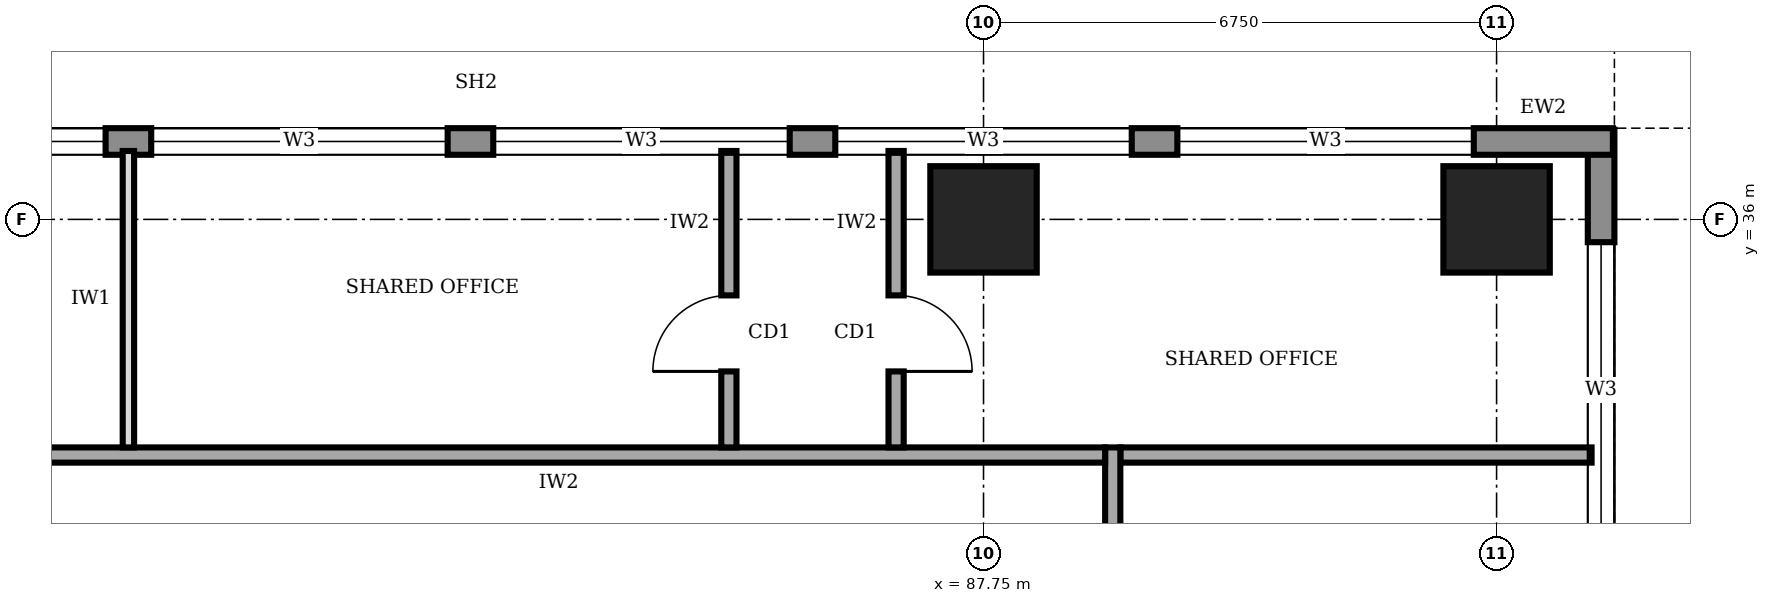
"""IFC4 building model, lengths in metres.
Left out: names, types, materials, properties, quantities, classifications, styles, units other than length and angle.
Written with IfcOpenShell. Run it as: python <this file> out.ifc"""

import sys

from ifc_helpers import new_model, si_unit, direction, frame, frame_2d, origin, origin_2d, place, context, subcontext, project, spatial, rectangle, extrude, element, fill, save


model = new_model("IFC4")
c1 = context("Model", 3, precision=1e-05, world=origin(), true_north=direction((0.0, 1.0)))
c2 = subcontext(c1, "Body", "Model", "MODEL_VIEW")
j1 = project(units=[si_unit("LENGTHUNIT", "METRE"), si_unit("PLANEANGLEUNIT", "RADIAN")], contexts=[c1])
p1 = place(None, origin())
s1 = spatial("IfcSite", under=j1, at=p1, CompositionType="ELEMENT")
p2 = place(p1, origin())
s2 = spatial("IfcBuilding", under=s1, at=p2, CompositionType="ELEMENT")
p3 = place(p2, frame((0.0, 0.0, 197.0)))
s3 = spatial("IfcBuildingStorey", under=s2, at=p3, CompositionType="ELEMENT", Elevation=197.0)
for number, where, z_axis, x_axis in (
    (1, (87.75, 36.0, 0.0), (0.0, 0.0, 1.0), (1.0, 0.0, 0.0)),
    (2, (94.5, 36.0, 0.0), (0.0, 0.0, 1.0), (1.0, 0.0, 0.0)),
):
    element("IfcColumn", number, at=place(p3, frame(where, z_axis=z_axis, x_axis=x_axis)), inside=s3, PredefinedType="COLUMN", context=c2, shape_type="SweptSolid", body=[
        extrude(rectangle(XDim=1.4, YDim=1.4, at=origin_2d()), origin(), (0.0, 0.0, 1.0), 4.0),
    ])
p4 = place(p3, frame((95.875, 3.32, 0.0), z_axis=(0.0, 0.0, 1.0), x_axis=(0.0, 1.0, 0.0)))
e3 = element("IfcWall", 3, at=p4, inside=s3, PredefinedType="STANDARD", context=c2, shape_type="SweptSolid", body=[
    extrude(rectangle(XDim=33.86, YDim=0.35, at=frame_2d((16.93, 0.0))), origin(), (0.0, 0.0, 1.0), 3.75),
])
p5 = place(p4, frame((1.48, 0.0, 0.95)))
e4 = element("IfcOpeningElement", 4, at=p5, cuts=e3, PredefinedType="OPENING", context=c2, shape_type="SweptSolid", body=[
    extrude(rectangle(XDim=3.9, YDim=1.8, at=frame_2d((1.95, 0.9))), frame((0.0, 0.185, 0.0), z_axis=(0.0, -1.0, 0.0), x_axis=(1.0, 0.0, 0.0)), (0.0, 0.0, 1.0), 0.37),
])
p6 = place(p4, frame((5.98, 0.0, 0.95)))
e5 = element("IfcOpeningElement", 5, at=p6, cuts=e3, PredefinedType="OPENING", context=c2, shape_type="SweptSolid", body=[
    extrude(rectangle(XDim=3.9, YDim=1.8, at=frame_2d((1.95, 0.9))), frame((0.0, 0.185, 0.0), z_axis=(0.0, -1.0, 0.0), x_axis=(1.0, 0.0, 0.0)), (0.0, 0.0, 1.0), 0.37),
])
p7 = place(p4, frame((10.48, 0.0, 0.95)))
e6 = element("IfcOpeningElement", 6, at=p7, cuts=e3, PredefinedType="OPENING", context=c2, shape_type="SweptSolid", body=[
    extrude(rectangle(XDim=3.9, YDim=1.8, at=frame_2d((1.95, 0.9))), frame((0.0, 0.185, 0.0), z_axis=(0.0, -1.0, 0.0), x_axis=(1.0, 0.0, 0.0)), (0.0, 0.0, 1.0), 0.37),
])
p8 = place(p4, frame((14.98, 0.0, 0.95)))
e7 = element("IfcOpeningElement", 7, at=p8, cuts=e3, PredefinedType="OPENING", context=c2, shape_type="SweptSolid", body=[
    extrude(rectangle(XDim=3.9, YDim=1.8, at=frame_2d((1.95, 0.9))), frame((0.0, 0.185, 0.0), z_axis=(0.0, -1.0, 0.0), x_axis=(1.0, 0.0, 0.0)), (0.0, 0.0, 1.0), 0.37),
])
p9 = place(p4, frame((19.48, 0.0, 0.95)))
e8 = element("IfcOpeningElement", 8, at=p9, cuts=e3, PredefinedType="OPENING", context=c2, shape_type="SweptSolid", body=[
    extrude(rectangle(XDim=3.9, YDim=1.8, at=frame_2d((1.95, 0.9))), frame((0.0, 0.185, 0.0), z_axis=(0.0, -1.0, 0.0), x_axis=(1.0, 0.0, 0.0)), (0.0, 0.0, 1.0), 0.37),
])
p10 = place(p4, frame((23.98, 0.0, 0.95)))
e9 = element("IfcOpeningElement", 9, at=p10, cuts=e3, PredefinedType="OPENING", context=c2, shape_type="SweptSolid", body=[
    extrude(rectangle(XDim=3.9, YDim=1.8, at=frame_2d((1.95, 0.9))), frame((0.0, 0.185, 0.0), z_axis=(0.0, -1.0, 0.0), x_axis=(1.0, 0.0, 0.0)), (0.0, 0.0, 1.0), 0.37),
])
p11 = place(p4, frame((28.48, 0.0, 0.95)))
e10 = element("IfcOpeningElement", 10, at=p11, cuts=e3, PredefinedType="OPENING", context=c2, shape_type="SweptSolid", body=[
    extrude(rectangle(XDim=3.9, YDim=1.8, at=frame_2d((1.95, 0.9))), frame((0.0, 0.185, 0.0), z_axis=(0.0, -1.0, 0.0), x_axis=(1.0, 0.0, 0.0)), (0.0, 0.0, 1.0), 0.37),
])
p12 = place(p3, frame((96.03, 37.025, 0.0), z_axis=(0.0, 0.0, 1.0), x_axis=(-1.0, 0.0, 0.0)))
e11 = element("IfcWall", 11, at=p12, inside=s3, PredefinedType="STANDARD", context=c2, shape_type="SweptSolid", body=[
    extrude(rectangle(XDim=29.91, YDim=0.35, at=frame_2d((14.955, 0.0))), origin(), (0.0, 0.0, 1.0), 3.75),
])
p13 = place(p12, frame((24.33, 0.0, 0.95)))
e12 = element("IfcOpeningElement", 12, at=p13, cuts=e11, PredefinedType="OPENING", context=c2, shape_type="SweptSolid", body=[
    extrude(rectangle(XDim=3.9, YDim=1.8, at=frame_2d((1.95, 0.9))), frame((0.0, 0.185, 0.0), z_axis=(0.0, -1.0, 0.0), x_axis=(1.0, 0.0, 0.0)), (0.0, 0.0, 1.0), 0.37),
])
p14 = place(p12, frame((19.83, 0.0, 0.95)))
e13 = element("IfcOpeningElement", 13, at=p14, cuts=e11, PredefinedType="OPENING", context=c2, shape_type="SweptSolid", body=[
    extrude(rectangle(XDim=3.9, YDim=1.8, at=frame_2d((1.95, 0.9))), frame((0.0, 0.185, 0.0), z_axis=(0.0, -1.0, 0.0), x_axis=(1.0, 0.0, 0.0)), (0.0, 0.0, 1.0), 0.37),
])
p15 = place(p12, frame((15.33, 0.0, 0.95)))
e14 = element("IfcOpeningElement", 14, at=p15, cuts=e11, PredefinedType="OPENING", context=c2, shape_type="SweptSolid", body=[
    extrude(rectangle(XDim=3.9, YDim=1.8, at=frame_2d((1.95, 0.9))), frame((0.0, 0.185, 0.0), z_axis=(0.0, -1.0, 0.0), x_axis=(1.0, 0.0, 0.0)), (0.0, 0.0, 1.0), 0.37),
])
p16 = place(p12, frame((10.83, 0.0, 0.95)))
e15 = element("IfcOpeningElement", 15, at=p16, cuts=e11, PredefinedType="OPENING", context=c2, shape_type="SweptSolid", body=[
    extrude(rectangle(XDim=3.9, YDim=1.8, at=frame_2d((1.95, 0.9))), frame((0.0, 0.185, 0.0), z_axis=(0.0, -1.0, 0.0), x_axis=(1.0, 0.0, 0.0)), (0.0, 0.0, 1.0), 0.37),
])
p17 = place(p12, frame((6.33, 0.0, 0.95)))
e16 = element("IfcOpeningElement", 16, at=p17, cuts=e11, PredefinedType="OPENING", context=c2, shape_type="SweptSolid", body=[
    extrude(rectangle(XDim=3.9, YDim=1.8, at=frame_2d((1.95, 0.9))), frame((0.0, 0.185, 0.0), z_axis=(0.0, -1.0, 0.0), x_axis=(1.0, 0.0, 0.0)), (0.0, 0.0, 1.0), 0.37),
])
p18 = place(p12, frame((1.83, 0.0, 0.95)))
e17 = element("IfcOpeningElement", 17, at=p18, cuts=e11, PredefinedType="OPENING", context=c2, shape_type="SweptSolid", body=[
    extrude(rectangle(XDim=3.9, YDim=1.8, at=frame_2d((1.95, 0.9))), frame((0.0, 0.185, 0.0), z_axis=(0.0, -1.0, 0.0), x_axis=(1.0, 0.0, 0.0)), (0.0, 0.0, 1.0), 0.37),
])
p19 = place(p3, frame((89.45, 7.7, 0.0), z_axis=(0.0, 0.0, 1.0), x_axis=(0.0, 1.0, 0.0)))
e18 = element("IfcWall", 18, at=p19, inside=s3, PredefinedType="SOLIDWALL", context=c2, shape_type="SweptSolid", body=[
    extrude(rectangle(XDim=25.3, YDim=0.2, at=frame_2d((12.65, 0.0))), origin(), (0.0, 0.0, 1.0), 3.75),
])
p20 = place(p19, frame((2.3, 0.0, 0.0)))
e19 = element("IfcOpeningElement", 19, at=p20, cuts=e18, PredefinedType="OPENING", context=c2, shape_type="SweptSolid", body=[
    extrude(rectangle(XDim=1.0, YDim=2.1, at=frame_2d((0.5, 1.05))), frame((0.0, 0.11, 0.0), z_axis=(0.0, -1.0, 0.0), x_axis=(1.0, 0.0, 0.0)), (0.0, 0.0, 1.0), 0.22),
])
p21 = place(p19, frame((7.25, 0.0, 0.0)))
e20 = element("IfcOpeningElement", 20, at=p21, cuts=e18, PredefinedType="OPENING", context=c2, shape_type="SweptSolid", body=[
    extrude(rectangle(XDim=0.9, YDim=2.1, at=frame_2d((0.45, 1.05))), frame((0.0, 0.11, 0.0), z_axis=(0.0, -1.0, 0.0), x_axis=(1.0, 0.0, 0.0)), (0.0, 0.0, 1.0), 0.22),
])
p22 = place(p19, frame((10.25, 0.0, 0.0)))
e21 = element("IfcOpeningElement", 21, at=p22, cuts=e18, PredefinedType="OPENING", context=c2, shape_type="SweptSolid", body=[
    extrude(rectangle(XDim=0.9, YDim=2.1, at=frame_2d((0.45, 1.05))), frame((0.0, 0.11, 0.0), z_axis=(0.0, -1.0, 0.0), x_axis=(1.0, 0.0, 0.0)), (0.0, 0.0, 1.0), 0.22),
])
p23 = place(p19, frame((15.1, 0.0, 0.0)))
e22 = element("IfcOpeningElement", 22, at=p23, cuts=e18, PredefinedType="OPENING", context=c2, shape_type="SweptSolid", body=[
    extrude(rectangle(XDim=0.9, YDim=2.1, at=frame_2d((0.45, 1.05))), frame((0.0, 0.11, 0.0), z_axis=(0.0, -1.0, 0.0), x_axis=(1.0, 0.0, 0.0)), (0.0, 0.0, 1.0), 0.22),
])
p24 = place(p19, frame((17.8, 0.0, 0.0)))
e23 = element("IfcOpeningElement", 23, at=p24, cuts=e18, PredefinedType="OPENING", context=c2, shape_type="SweptSolid", body=[
    extrude(rectangle(XDim=1.0, YDim=2.1, at=frame_2d((0.5, 1.05))), frame((0.0, 0.11, 0.0), z_axis=(0.0, -1.0, 0.0), x_axis=(1.0, 0.0, 0.0)), (0.0, 0.0, 1.0), 0.22),
])
p25 = place(p19, frame((12.3, 0.0, 0.0)))
e24 = element("IfcOpeningElement", 24, at=p25, cuts=e18, PredefinedType="OPENING", context=c2, shape_type="SweptSolid", body=[
    extrude(rectangle(XDim=1.0, YDim=2.1, at=frame_2d((0.5, 1.05))), frame((0.0, 0.11, 0.0), z_axis=(0.0, -1.0, 0.0), x_axis=(1.0, 0.0, 0.0)), (0.0, 0.0, 1.0), 0.22),
])
p26 = place(p19, frame((21.8, 0.0, 0.0)))
e25 = element("IfcOpeningElement", 25, at=p26, cuts=e18, PredefinedType="OPENING", context=c2, shape_type="SweptSolid", body=[
    extrude(rectangle(XDim=1.0, YDim=2.1, at=frame_2d((0.5, 1.05))), frame((0.0, 0.11, 0.0), z_axis=(0.0, -1.0, 0.0), x_axis=(1.0, 0.0, 0.0)), (0.0, 0.0, 1.0), 0.22),
])
p27 = place(p3, frame((89.35, 32.9, 0.0), z_axis=(0.0, 0.0, 1.0), x_axis=(-1.0, 0.0, 0.0)))
e26 = element("IfcWall", 26, at=p27, inside=s3, PredefinedType="SOLIDWALL", context=c2, shape_type="SweptSolid", body=[
    extrude(rectangle(XDim=16.9, YDim=0.2, at=frame_2d((8.45, 0.0))), origin(), (0.0, 0.0, 1.0), 3.75),
])
p28 = place(p27, frame((14.375, 0.0, 0.0)))
e27 = element("IfcOpeningElement", 27, at=p28, cuts=e26, PredefinedType="OPENING", context=c2, shape_type="SweptSolid", body=[
    extrude(rectangle(XDim=1.0, YDim=2.1, at=frame_2d((0.5, 1.05))), frame((0.0, 0.11, 0.0), z_axis=(0.0, -1.0, 0.0), x_axis=(1.0, 0.0, 0.0)), (0.0, 0.0, 1.0), 0.22),
])
p29 = place(p3, frame((84.4, 33.0, 0.0), z_axis=(0.0, 0.0, 1.0), x_axis=(0.0, 1.0, 0.0)))
e28 = element("IfcWall", 28, at=p29, inside=s3, PredefinedType="SOLIDWALL", context=c2, shape_type="SweptSolid", body=[
    extrude(rectangle(XDim=3.9, YDim=0.2, at=frame_2d((1.95, 0.0))), origin(), (0.0, 0.0, 1.0), 3.75),
])
p30 = place(p29, frame((1.0, 0.0, 0.0)))
e29 = element("IfcOpeningElement", 29, at=p30, cuts=e28, PredefinedType="OPENING", context=c2, shape_type="SweptSolid", body=[
    extrude(rectangle(XDim=1.0, YDim=2.1, at=frame_2d((0.5, 1.05))), frame((0.0, 0.11, 0.0), z_axis=(0.0, -1.0, 0.0), x_axis=(1.0, 0.0, 0.0)), (0.0, 0.0, 1.0), 0.22),
])
p31 = place(p3, frame((86.6, 36.9, 0.0), z_axis=(0.0, 0.0, 1.0), x_axis=(0.0, -1.0, 0.0)))
e30 = element("IfcWall", 30, at=p31, inside=s3, PredefinedType="SOLIDWALL", context=c2, shape_type="SweptSolid", body=[
    extrude(rectangle(XDim=3.9, YDim=0.2, at=frame_2d((1.95, 0.0))), origin(), (0.0, 0.0, 1.0), 3.75),
])
p32 = place(p31, frame((1.9, 0.0, 0.0)))
e31 = element("IfcOpeningElement", 31, at=p32, cuts=e30, PredefinedType="OPENING", context=c2, shape_type="SweptSolid", body=[
    extrude(rectangle(XDim=1.0, YDim=2.1, at=frame_2d((0.5, 1.05))), frame((0.0, 0.11, 0.0), z_axis=(0.0, -1.0, 0.0), x_axis=(1.0, 0.0, 0.0)), (0.0, 0.0, 1.0), 0.22),
])
p33 = place(p3, frame((89.55, 32.9, 0.0), z_axis=(0.0, 0.0, 1.0), x_axis=(1.0, 0.0, 0.0)))
e32 = element("IfcWall", 32, at=p33, inside=s3, PredefinedType="SOLIDWALL", context=c2, shape_type="SweptSolid", body=[
    extrude(rectangle(XDim=6.2, YDim=0.2, at=frame_2d((3.1, 0.0))), origin(), (0.0, 0.0, 1.0), 3.75),
])
p34 = place(p3, frame((76.5, 33.0, 0.0), z_axis=(0.0, 0.0, 1.0), x_axis=(0.0, 1.0, 0.0)))
e33 = element("IfcWall", 33, at=p34, inside=s3, PredefinedType="PARTITIONING", context=c2, shape_type="SweptSolid", body=[
    extrude(rectangle(XDim=3.9, YDim=0.15, at=frame_2d((1.95, 0.0))), origin(), (0.0, 0.0, 1.0), 3.75),
])
p35 = place(p11, origin())
e34 = element("IfcWindow", 34, at=p35, inside=s3, PartitioningType="SINGLE_PANEL", PredefinedType="WINDOW", context=c2, shape_type="SweptSolid", body=[
    extrude(rectangle(XDim=3.9, YDim=1.8, at=frame_2d((1.95, 0.9))), frame((0.0, 0.03, 0.0), z_axis=(0.0, -1.0, 0.0), x_axis=(1.0, 0.0, 0.0)), (0.0, 0.0, 1.0), 0.06),
])
fill(e10, e34)
p36 = place(p14, origin())
e35 = element("IfcWindow", 35, at=p36, inside=s3, PartitioningType="SINGLE_PANEL", PredefinedType="WINDOW", context=c2, shape_type="SweptSolid", body=[
    extrude(rectangle(XDim=3.9, YDim=1.8, at=frame_2d((1.95, 0.9))), frame((0.0, 0.03, 0.0), z_axis=(0.0, -1.0, 0.0), x_axis=(1.0, 0.0, 0.0)), (0.0, 0.0, 1.0), 0.06),
])
fill(e13, e35)
p37 = place(p15, origin())
e36 = element("IfcWindow", 36, at=p37, inside=s3, PartitioningType="SINGLE_PANEL", PredefinedType="WINDOW", context=c2, shape_type="SweptSolid", body=[
    extrude(rectangle(XDim=3.9, YDim=1.8, at=frame_2d((1.95, 0.9))), frame((0.0, 0.03, 0.0), z_axis=(0.0, -1.0, 0.0), x_axis=(1.0, 0.0, 0.0)), (0.0, 0.0, 1.0), 0.06),
])
fill(e14, e36)
p38 = place(p16, origin())
e37 = element("IfcWindow", 37, at=p38, inside=s3, PartitioningType="SINGLE_PANEL", PredefinedType="WINDOW", context=c2, shape_type="SweptSolid", body=[
    extrude(rectangle(XDim=3.9, YDim=1.8, at=frame_2d((1.95, 0.9))), frame((0.0, 0.03, 0.0), z_axis=(0.0, -1.0, 0.0), x_axis=(1.0, 0.0, 0.0)), (0.0, 0.0, 1.0), 0.06),
])
fill(e15, e37)
p39 = place(p17, origin())
e38 = element("IfcWindow", 38, at=p39, inside=s3, PartitioningType="SINGLE_PANEL", PredefinedType="WINDOW", context=c2, shape_type="SweptSolid", body=[
    extrude(rectangle(XDim=3.9, YDim=1.8, at=frame_2d((1.95, 0.9))), frame((0.0, 0.03, 0.0), z_axis=(0.0, -1.0, 0.0), x_axis=(1.0, 0.0, 0.0)), (0.0, 0.0, 1.0), 0.06),
])
fill(e16, e38)
p40 = place(p18, origin())
e39 = element("IfcWindow", 39, at=p40, inside=s3, PartitioningType="SINGLE_PANEL", PredefinedType="WINDOW", context=c2, shape_type="SweptSolid", body=[
    extrude(rectangle(XDim=3.9, YDim=1.8, at=frame_2d((1.95, 0.9))), frame((0.0, 0.03, 0.0), z_axis=(0.0, -1.0, 0.0), x_axis=(1.0, 0.0, 0.0)), (0.0, 0.0, 1.0), 0.06),
])
fill(e17, e39)
p41 = place(p30, origin())
e40 = element("IfcDoor", 40, at=p41, inside=s3, OperationType="SINGLE_SWING_LEFT", PredefinedType="DOOR", context=c2, shape_type="SweptSolid", body=[
    extrude(rectangle(XDim=1.0, YDim=2.1, at=frame_2d((0.5, 1.05))), frame((0.0, 0.025, 0.0), z_axis=(0.0, -1.0, 0.0), x_axis=(1.0, 0.0, 0.0)), (0.0, 0.0, 1.0), 0.05),
])
fill(e29, e40)
p42 = place(p32, origin())
e41 = element("IfcDoor", 41, at=p42, inside=s3, OperationType="SINGLE_SWING_RIGHT", PredefinedType="DOOR", context=c2, shape_type="SweptSolid", body=[
    extrude(rectangle(XDim=1.0, YDim=2.1, at=frame_2d((0.5, 1.05))), frame((0.0, 0.025, 0.0), z_axis=(0.0, -1.0, 0.0), x_axis=(1.0, 0.0, 0.0)), (0.0, 0.0, 1.0), 0.05),
])
fill(e31, e41)
save(model, sys.argv[1])
